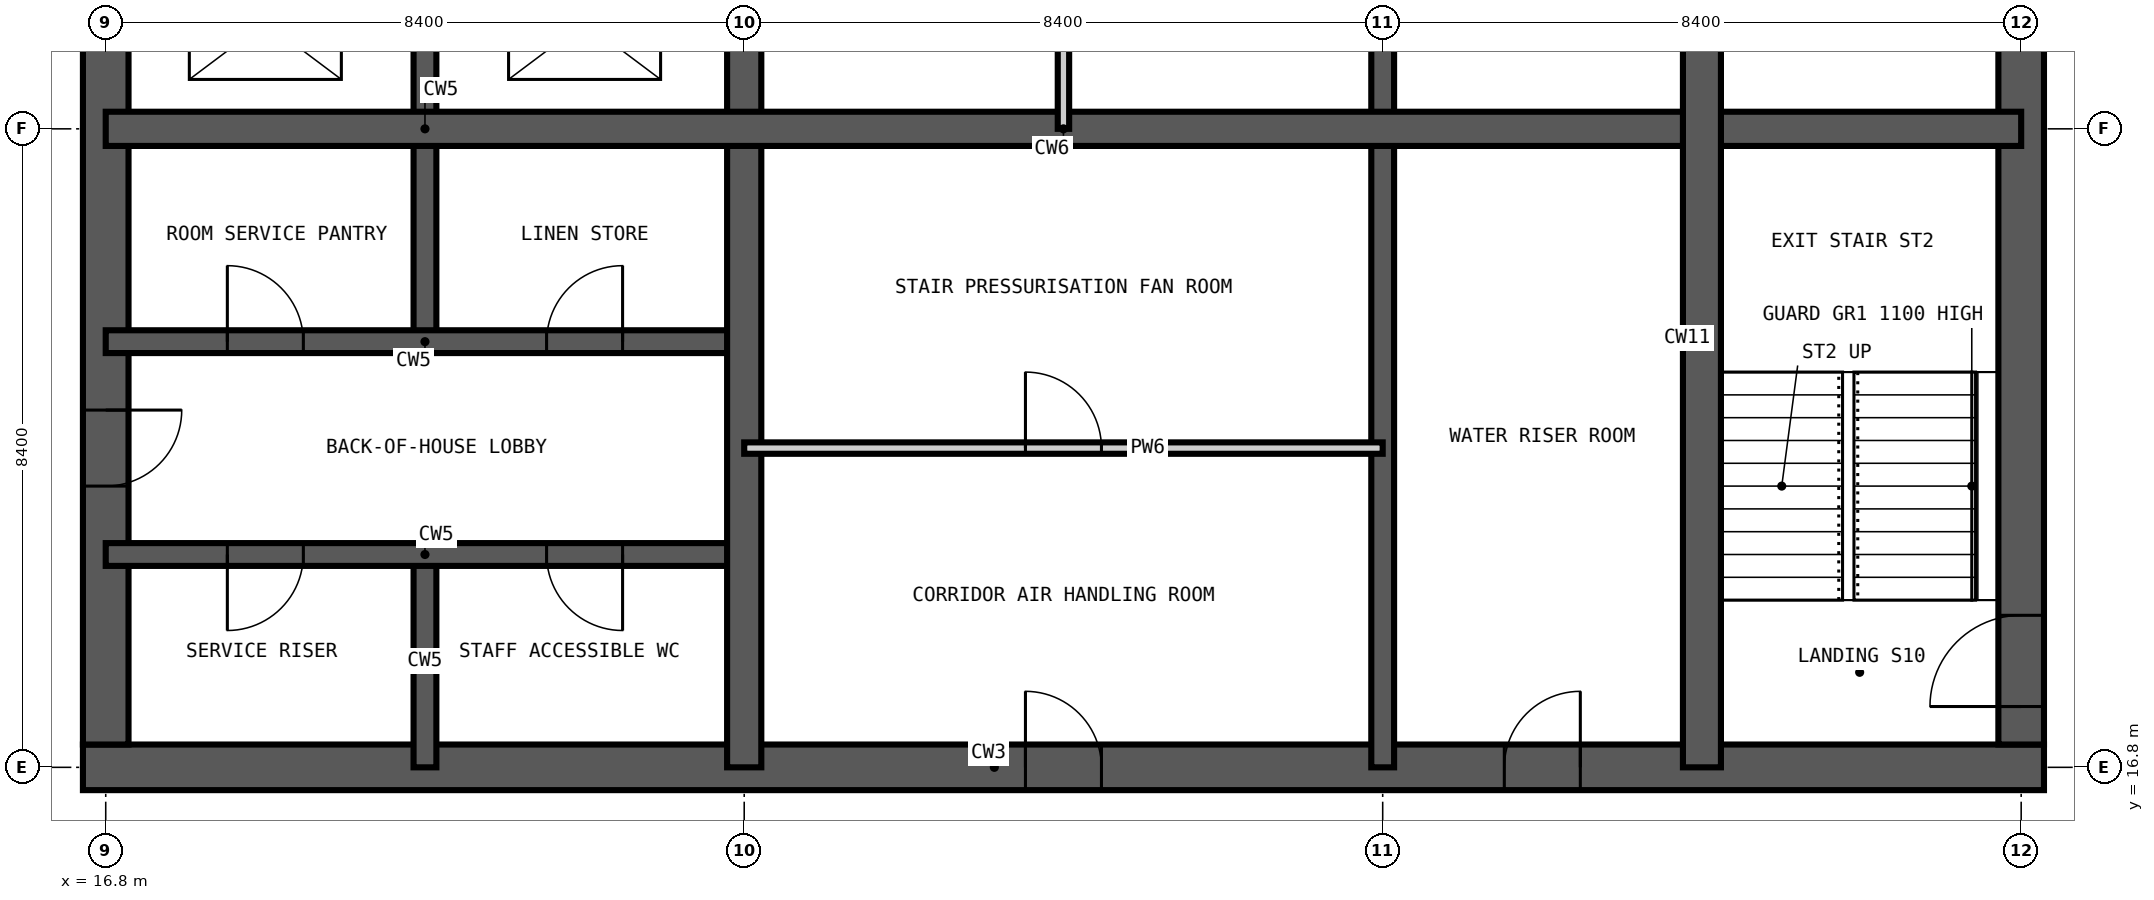
"""IFC4 building model, lengths in metres.
Left out: names, types, materials, properties, quantities, classifications, styles, units other than length and angle.
Written with IfcOpenShell. Run it as: python <this file> out.ifc"""

import sys

from ifc_helpers import new_model, si_unit, direction, frame, frame_2d, origin, place, context, subcontext, project, spatial, rectangle, extrude, element, fill, save


model = new_model("IFC4")
c1 = context("Model", 3, precision=1e-05, world=origin(), true_north=direction((0.0, 1.0)))
c2 = subcontext(c1, "Body", "Model", "MODEL_VIEW")
j1 = project(units=[si_unit("LENGTHUNIT", "METRE"), si_unit("PLANEANGLEUNIT", "RADIAN")], contexts=[c1])
p1 = place(None, origin())
s1 = spatial("IfcSite", under=j1, at=p1, CompositionType="ELEMENT")
p2 = place(p1, origin())
s2 = spatial("IfcBuilding", under=s1, at=p2, CompositionType="ELEMENT")
p3 = place(p2, frame((0.0, 0.0, 180.6)))
s3 = spatial("IfcBuildingStorey", under=s2, at=p3, CompositionType="ELEMENT", Elevation=180.6)
p4 = place(p3, frame((16.5, 16.8, -0.35), z_axis=(0.0, 0.0, 1.0), x_axis=(1.0, 0.0, 0.0)))
e1 = element("IfcWall", 1, at=p4, inside=s3, PredefinedType="SHEAR", context=c2, shape_type="SweptSolid", body=[
    extrude(rectangle(XDim=25.8, YDim=0.6, at=frame_2d((12.9, 0.0))), origin(), (0.0, 0.0, 1.0), 3.6),
])
p5 = place(p4, frame((12.4, 0.0, 0.35)))
e2 = element("IfcOpeningElement", 2, at=p5, cuts=e1, PredefinedType="OPENING", context=c2, shape_type="SweptSolid", body=[
    extrude(rectangle(XDim=1.0, YDim=2.1, at=frame_2d((0.5, 1.05))), frame((0.0, 0.31, 0.0), z_axis=(0.0, -1.0, 0.0), x_axis=(1.0, 0.0, 0.0)), (0.0, 0.0, 1.0), 0.62),
])
p6 = place(p4, frame((18.7, 0.0, 0.35)))
e3 = element("IfcOpeningElement", 3, at=p6, cuts=e1, PredefinedType="OPENING", context=c2, shape_type="SweptSolid", body=[
    extrude(rectangle(XDim=1.0, YDim=2.1, at=frame_2d((0.5, 1.05))), frame((0.0, 0.31, 0.0), z_axis=(0.0, -1.0, 0.0), x_axis=(1.0, 0.0, 0.0)), (0.0, 0.0, 1.0), 0.62),
])
p7 = place(p3, frame((42.0, 17.1, -0.35), z_axis=(0.0, 0.0, 1.0), x_axis=(0.0, 1.0, 0.0)))
e4 = element("IfcWall", 4, at=p7, inside=s3, PredefinedType="SHEAR", context=c2, shape_type="SweptSolid", body=[
    extrude(rectangle(XDim=24.6, YDim=0.6, at=frame_2d((12.3, 0.0))), origin(), (0.0, 0.0, 1.0), 3.6),
])
p8 = place(p7, frame((0.5, 0.0, 0.35)))
e5 = element("IfcOpeningElement", 5, at=p8, cuts=e4, PredefinedType="OPENING", context=c2, shape_type="SweptSolid", body=[
    extrude(rectangle(XDim=1.2, YDim=2.2, at=frame_2d((0.6, 1.1))), frame((0.0, 0.31, 0.0), z_axis=(0.0, -1.0, 0.0), x_axis=(1.0, 0.0, 0.0)), (0.0, 0.0, 1.0), 0.62),
])
p9 = place(p7, frame((11.8, 0.0, 0.35)))
e6 = element("IfcOpeningElement", 6, at=p9, cuts=e4, PredefinedType="OPENING", context=c2, shape_type="SweptSolid", body=[
    extrude(rectangle(XDim=1.0, YDim=2.1, at=frame_2d((0.5, 1.05))), frame((0.0, 0.31, 0.0), z_axis=(0.0, -1.0, 0.0), x_axis=(1.0, 0.0, 0.0)), (0.0, 0.0, 1.0), 0.62),
])
p10 = place(p7, frame((20.2, 0.0, 0.35)))
e7 = element("IfcOpeningElement", 7, at=p10, cuts=e4, PredefinedType="OPENING", context=c2, shape_type="SweptSolid", body=[
    extrude(rectangle(XDim=1.0, YDim=2.1, at=frame_2d((0.5, 1.05))), frame((0.0, 0.31, 0.0), z_axis=(0.0, -1.0, 0.0), x_axis=(1.0, 0.0, 0.0)), (0.0, 0.0, 1.0), 0.62),
])
p11 = place(p3, frame((16.8, 41.7, -0.35), z_axis=(0.0, 0.0, 1.0), x_axis=(0.0, -1.0, 0.0)))
e8 = element("IfcWall", 8, at=p11, inside=s3, PredefinedType="SHEAR", context=c2, shape_type="SweptSolid", body=[
    extrude(rectangle(XDim=24.6, YDim=0.6, at=frame_2d((12.3, 0.0))), origin(), (0.0, 0.0, 1.0), 3.6),
])
p12 = place(p11, frame((11.4, 0.0, 0.35)))
e9 = element("IfcOpeningElement", 9, at=p12, cuts=e8, PredefinedType="OPENING", context=c2, shape_type="SweptSolid", body=[
    extrude(rectangle(XDim=1.8, YDim=2.2, at=frame_2d((0.9, 1.1))), frame((0.0, 0.31, 0.0), z_axis=(0.0, -1.0, 0.0), x_axis=(1.0, 0.0, 0.0)), (0.0, 0.0, 1.0), 0.62),
])
p13 = place(p11, frame((20.2, 0.0, 0.35)))
e10 = element("IfcOpeningElement", 10, at=p13, cuts=e8, PredefinedType="OPENING", context=c2, shape_type="SweptSolid", body=[
    extrude(rectangle(XDim=1.0, YDim=2.1, at=frame_2d((0.5, 1.05))), frame((0.0, 0.31, 0.0), z_axis=(0.0, -1.0, 0.0), x_axis=(1.0, 0.0, 0.0)), (0.0, 0.0, 1.0), 0.62),
])
p14 = place(p11, frame((5.5, 0.0, 0.35)))
e11 = element("IfcOpeningElement", 11, at=p14, cuts=e8, PredefinedType="OPENING", context=c2, shape_type="SweptSolid", body=[
    extrude(rectangle(XDim=1.0, YDim=2.1, at=frame_2d((0.5, 1.05))), frame((0.0, 0.31, 0.0), z_axis=(0.0, -1.0, 0.0), x_axis=(1.0, 0.0, 0.0)), (0.0, 0.0, 1.0), 0.62),
])
p15 = place(p3, frame((21.0, 16.8, -0.35), z_axis=(0.0, 0.0, 1.0), x_axis=(0.0, 1.0, 0.0)))
e12 = element("IfcWall", 12, at=p15, inside=s3, PredefinedType="SHEAR", context=c2, shape_type="SweptSolid", body=[
    extrude(rectangle(XDim=2.8, YDim=0.3, at=frame_2d((1.4, 0.0))), origin(), (0.0, 0.0, 1.0), 3.6),
])
p16 = place(p3, frame((21.0, 22.4, -0.35), z_axis=(0.0, 0.0, 1.0), x_axis=(0.0, 1.0, 0.0)))
e13 = element("IfcWall", 13, at=p16, inside=s3, PredefinedType="SHEAR", context=c2, shape_type="SweptSolid", body=[
    extrude(rectangle(XDim=5.6, YDim=0.3, at=frame_2d((2.8, 0.0))), origin(), (0.0, 0.0, 1.0), 3.6),
])
p17 = place(p3, frame((33.6, 16.8, -0.35), z_axis=(0.0, 0.0, 1.0), x_axis=(0.0, 1.0, 0.0)))
e14 = element("IfcWall", 14, at=p17, inside=s3, PredefinedType="SHEAR", context=c2, shape_type="SweptSolid", body=[
    extrude(rectangle(XDim=25.2, YDim=0.3, at=frame_2d((12.6, 0.0))), origin(), (0.0, 0.0, 1.0), 3.6),
])
p18 = place(p17, frame((22.5, 0.0, 0.35)))
e15 = element("IfcOpeningElement", 15, at=p18, cuts=e14, PredefinedType="OPENING", context=c2, shape_type="SweptSolid", body=[
    extrude(rectangle(XDim=1.2, YDim=2.2, at=frame_2d((0.6, 1.1))), frame((0.0, 0.16, 0.0), z_axis=(0.0, -1.0, 0.0), x_axis=(1.0, 0.0, 0.0)), (0.0, 0.0, 1.0), 0.32),
])
p19 = place(p17, frame((18.3, 0.0, 0.35)))
e16 = element("IfcOpeningElement", 16, at=p19, cuts=e14, PredefinedType="OPENING", context=c2, shape_type="SweptSolid", body=[
    extrude(rectangle(XDim=1.2, YDim=2.2, at=frame_2d((0.6, 1.1))), frame((0.0, 0.16, 0.0), z_axis=(0.0, -1.0, 0.0), x_axis=(1.0, 0.0, 0.0)), (0.0, 0.0, 1.0), 0.32),
])
p20 = place(p17, frame((12.1, 0.0, 0.35)))
e17 = element("IfcOpeningElement", 17, at=p20, cuts=e14, PredefinedType="OPENING", context=c2, shape_type="SweptSolid", body=[
    extrude(rectangle(XDim=1.0, YDim=2.1, at=frame_2d((0.5, 1.05))), frame((0.0, 0.16, 0.0), z_axis=(0.0, -1.0, 0.0), x_axis=(1.0, 0.0, 0.0)), (0.0, 0.0, 1.0), 0.32),
])
p21 = place(p3, frame((16.8, 19.6, -0.35), z_axis=(0.0, 0.0, 1.0), x_axis=(1.0, 0.0, 0.0)))
e18 = element("IfcWall", 18, at=p21, inside=s3, PredefinedType="SHEAR", context=c2, shape_type="SweptSolid", body=[
    extrude(rectangle(XDim=8.4, YDim=0.3, at=frame_2d((4.2, 0.0))), origin(), (0.0, 0.0, 1.0), 3.6),
])
p22 = place(p21, frame((1.6, 0.0, 0.35)))
e19 = element("IfcOpeningElement", 19, at=p22, cuts=e18, PredefinedType="OPENING", context=c2, shape_type="SweptSolid", body=[
    extrude(rectangle(XDim=1.0, YDim=2.1, at=frame_2d((0.5, 1.05))), frame((0.0, 0.16, 0.0), z_axis=(0.0, -1.0, 0.0), x_axis=(1.0, 0.0, 0.0)), (0.0, 0.0, 1.0), 0.32),
])
p23 = place(p21, frame((5.8, 0.0, 0.35)))
e20 = element("IfcOpeningElement", 20, at=p23, cuts=e18, PredefinedType="OPENING", context=c2, shape_type="SweptSolid", body=[
    extrude(rectangle(XDim=1.0, YDim=2.1, at=frame_2d((0.5, 1.05))), frame((0.0, 0.16, 0.0), z_axis=(0.0, -1.0, 0.0), x_axis=(1.0, 0.0, 0.0)), (0.0, 0.0, 1.0), 0.32),
])
p24 = place(p3, frame((16.8, 22.4, -0.35), z_axis=(0.0, 0.0, 1.0), x_axis=(1.0, 0.0, 0.0)))
e21 = element("IfcWall", 21, at=p24, inside=s3, PredefinedType="SHEAR", context=c2, shape_type="SweptSolid", body=[
    extrude(rectangle(XDim=8.4, YDim=0.3, at=frame_2d((4.2, 0.0))), origin(), (0.0, 0.0, 1.0), 3.6),
])
p25 = place(p24, frame((1.6, 0.0, 0.35)))
e22 = element("IfcOpeningElement", 22, at=p25, cuts=e21, PredefinedType="OPENING", context=c2, shape_type="SweptSolid", body=[
    extrude(rectangle(XDim=1.0, YDim=2.1, at=frame_2d((0.5, 1.05))), frame((0.0, 0.16, 0.0), z_axis=(0.0, -1.0, 0.0), x_axis=(1.0, 0.0, 0.0)), (0.0, 0.0, 1.0), 0.32),
])
p26 = place(p24, frame((5.8, 0.0, 0.35)))
e23 = element("IfcOpeningElement", 23, at=p26, cuts=e21, PredefinedType="OPENING", context=c2, shape_type="SweptSolid", body=[
    extrude(rectangle(XDim=1.0, YDim=2.1, at=frame_2d((0.5, 1.05))), frame((0.0, 0.16, 0.0), z_axis=(0.0, -1.0, 0.0), x_axis=(1.0, 0.0, 0.0)), (0.0, 0.0, 1.0), 0.32),
])
for number, where, z_axis, x_axis in (
    (24, (25.2, 16.8, -0.35), (0.0, 0.0, 1.0), (0.0, 1.0, 0.0)),
    (25, (16.8, 25.2, -0.35), (0.0, 0.0, 1.0), (1.0, 0.0, 0.0)),
):
    element("IfcWall", number, at=place(p3, frame(where, z_axis=z_axis, x_axis=x_axis)), inside=s3, PredefinedType="SHEAR", context=c2, shape_type="SweptSolid", body=[
        extrude(rectangle(XDim=25.2, YDim=0.45, at=frame_2d((12.6, 0.0))), origin(), (0.0, 0.0, 1.0), 3.6),
    ])
p27 = place(p3, frame((37.8, 16.8, -0.35), z_axis=(0.0, 0.0, 1.0), x_axis=(0.0, 1.0, 0.0)))
e26 = element("IfcWall", 26, at=p27, inside=s3, PredefinedType="SHEAR", context=c2, shape_type="SweptSolid", body=[
    extrude(rectangle(XDim=11.2, YDim=0.5, at=frame_2d((5.6, 0.0))), origin(), (0.0, 0.0, 1.0), 3.6),
])
p28 = place(p3, frame((29.4, 25.2, 0.0), z_axis=(0.0, 0.0, 1.0), x_axis=(0.0, 1.0, 0.0)))
e27 = element("IfcWall", 27, at=p28, inside=s3, PredefinedType="PARTITIONING", context=c2, shape_type="SweptSolid", body=[
    extrude(rectangle(XDim=2.8, YDim=0.15, at=frame_2d((1.4, 0.0))), origin(), (0.0, 0.0, 1.0), 3.25),
])
p29 = place(p3, frame((25.2, 21.0, 0.0), z_axis=(0.0, 0.0, 1.0), x_axis=(1.0, 0.0, 0.0)))
e28 = element("IfcWall", 28, at=p29, inside=s3, PredefinedType="PARTITIONING", context=c2, shape_type="SweptSolid", body=[
    extrude(rectangle(XDim=8.4, YDim=0.15, at=frame_2d((4.2, 0.0))), origin(), (0.0, 0.0, 1.0), 3.25),
])
p30 = place(p29, frame((3.7, 0.0, 0.0)))
e29 = element("IfcOpeningElement", 29, at=p30, cuts=e28, PredefinedType="OPENING", context=c2, shape_type="SweptSolid", body=[
    extrude(rectangle(XDim=1.0, YDim=2.1, at=frame_2d((0.5, 1.05))), frame((0.0, 0.085, 0.0), z_axis=(0.0, -1.0, 0.0), x_axis=(1.0, 0.0, 0.0)), (0.0, 0.0, 1.0), 0.17),
])
p31 = place(p8, origin())
e30 = element("IfcDoor", 30, at=p31, inside=s3, OperationType="SINGLE_SWING_LEFT", PredefinedType="DOOR", context=c2, shape_type="SweptSolid", body=[
    extrude(rectangle(XDim=1.2, YDim=2.2, at=frame_2d((0.6, 1.1))), frame((0.0, 0.025, 0.0), z_axis=(0.0, -1.0, 0.0), x_axis=(1.0, 0.0, 0.0)), (0.0, 0.0, 1.0), 0.05),
])
fill(e5, e30)
p32 = place(p22, frame((1.0, 0.0, 0.0), z_axis=(0.0, 0.0, 1.0), x_axis=(-1.0, 0.0, 0.0)))
e31 = element("IfcDoor", 31, at=p32, inside=s3, OperationType="SINGLE_SWING_RIGHT", PredefinedType="DOOR", context=c2, shape_type="SweptSolid", body=[
    extrude(rectangle(XDim=1.0, YDim=2.1, at=frame_2d((0.5, 1.05))), frame((0.0, 0.025, 0.0), z_axis=(0.0, -1.0, 0.0), x_axis=(1.0, 0.0, 0.0)), (0.0, 0.0, 1.0), 0.05),
])
fill(e19, e31)
p33 = place(p23, frame((1.0, 0.0, 0.0), z_axis=(0.0, 0.0, 1.0), x_axis=(-1.0, 0.0, 0.0)))
e32 = element("IfcDoor", 32, at=p33, inside=s3, OperationType="SINGLE_SWING_LEFT", PredefinedType="DOOR", context=c2, shape_type="SweptSolid", body=[
    extrude(rectangle(XDim=1.0, YDim=2.1, at=frame_2d((0.5, 1.05))), frame((0.0, 0.025, 0.0), z_axis=(0.0, -1.0, 0.0), x_axis=(1.0, 0.0, 0.0)), (0.0, 0.0, 1.0), 0.05),
])
fill(e20, e32)
p34 = place(p25, origin())
e33 = element("IfcDoor", 33, at=p34, inside=s3, OperationType="SINGLE_SWING_LEFT", PredefinedType="DOOR", context=c2, shape_type="SweptSolid", body=[
    extrude(rectangle(XDim=1.0, YDim=2.1, at=frame_2d((0.5, 1.05))), frame((0.0, 0.025, 0.0), z_axis=(0.0, -1.0, 0.0), x_axis=(1.0, 0.0, 0.0)), (0.0, 0.0, 1.0), 0.05),
])
fill(e22, e33)
p35 = place(p26, origin())
e34 = element("IfcDoor", 34, at=p35, inside=s3, OperationType="SINGLE_SWING_RIGHT", PredefinedType="DOOR", context=c2, shape_type="SweptSolid", body=[
    extrude(rectangle(XDim=1.0, YDim=2.1, at=frame_2d((0.5, 1.05))), frame((0.0, 0.025, 0.0), z_axis=(0.0, -1.0, 0.0), x_axis=(1.0, 0.0, 0.0)), (0.0, 0.0, 1.0), 0.05),
])
fill(e23, e34)
p36 = place(p13, origin())
e35 = element("IfcDoor", 35, at=p36, inside=s3, OperationType="SINGLE_SWING_LEFT", PredefinedType="DOOR", context=c2, shape_type="SweptSolid", body=[
    extrude(rectangle(XDim=1.0, YDim=2.1, at=frame_2d((0.5, 1.05))), frame((0.0, 0.025, 0.0), z_axis=(0.0, -1.0, 0.0), x_axis=(1.0, 0.0, 0.0)), (0.0, 0.0, 1.0), 0.05),
])
fill(e10, e35)
p37 = place(p5, origin())
e36 = element("IfcDoor", 36, at=p37, inside=s3, OperationType="SINGLE_SWING_LEFT", PredefinedType="DOOR", context=c2, shape_type="SweptSolid", body=[
    extrude(rectangle(XDim=1.0, YDim=2.1, at=frame_2d((0.5, 1.05))), frame((0.0, 0.025, 0.0), z_axis=(0.0, -1.0, 0.0), x_axis=(1.0, 0.0, 0.0)), (0.0, 0.0, 1.0), 0.05),
])
fill(e2, e36)
p38 = place(p30, origin())
e37 = element("IfcDoor", 37, at=p38, inside=s3, OperationType="SINGLE_SWING_LEFT", PredefinedType="DOOR", context=c2, shape_type="SweptSolid", body=[
    extrude(rectangle(XDim=1.0, YDim=2.1, at=frame_2d((0.5, 1.05))), frame((0.0, 0.025, 0.0), z_axis=(0.0, -1.0, 0.0), x_axis=(1.0, 0.0, 0.0)), (0.0, 0.0, 1.0), 0.05),
])
fill(e29, e37)
p39 = place(p6, origin())
e38 = element("IfcDoor", 38, at=p39, inside=s3, OperationType="SINGLE_SWING_RIGHT", PredefinedType="DOOR", context=c2, shape_type="SweptSolid", body=[
    extrude(rectangle(XDim=1.0, YDim=2.1, at=frame_2d((0.5, 1.05))), frame((0.0, 0.025, 0.0), z_axis=(0.0, -1.0, 0.0), x_axis=(1.0, 0.0, 0.0)), (0.0, 0.0, 1.0), 0.05),
])
fill(e3, e38)
save(model, sys.argv[1])
